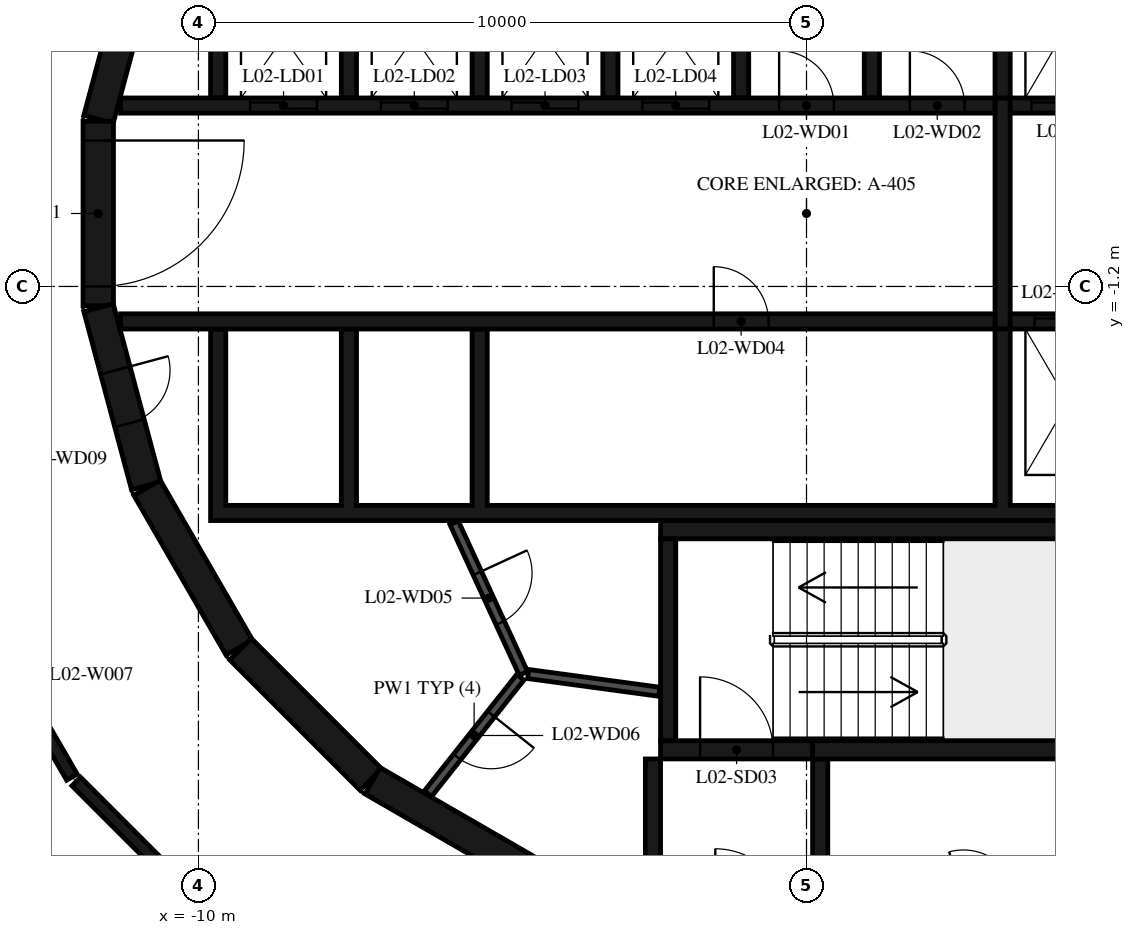
"""IFC4 building model, lengths in metres.
Left out: names, types, materials, properties, quantities, classifications, styles, units other than length and angle.
Written with IfcOpenShell. Run it as: python <this file> out.ifc"""

import sys

from ifc_helpers import new_model, si_unit, direction, frame, frame_2d, origin, place, context, subcontext, project, spatial, polyline, rectangle, outline, extrude, element, fill, save


model = new_model("IFC4")
c1 = context("Model", 3, precision=1e-05, world=origin(), true_north=direction((0.0, 1.0)))
c2 = subcontext(c1, "Body", "Model", "MODEL_VIEW")
j1 = project(units=[si_unit("LENGTHUNIT", "METRE"), si_unit("PLANEANGLEUNIT", "RADIAN")], contexts=[c1])
p1 = place(None, origin())
s1 = spatial("IfcSite", under=j1, at=p1, CompositionType="ELEMENT")
p2 = place(p1, origin())
s2 = spatial("IfcBuilding", under=s1, at=p2, CompositionType="ELEMENT")
p3 = place(p2, frame((0.0, 0.0, 13.8)))
s3 = spatial("IfcBuildingStorey", under=s2, at=p3, CompositionType="ELEMENT", Elevation=13.8)
p4 = place(p3, frame((-10.858, 4.479, 0.0), z_axis=(0.0, 0.0, 1.0), x_axis=(-0.258734743916, -0.965948410781, 0.0)))
e1 = element("IfcWall", 1, at=p4, inside=s3, PredefinedType="SHEAR", context=c2, shape_type="SweptSolid", body=[
    extrude(rectangle(XDim=3.033, YDim=0.5, at=frame_2d((1.516, 0.0))), origin(), (0.0, 0.0, 1.0), 4.42),
])
p5 = place(p3, frame((-11.647, 1.516, 0.0), z_axis=(0.0, 0.0, 1.0), x_axis=(0.0, -1.0, 0.0)))
e2 = element("IfcWall", 2, at=p5, inside=s3, PredefinedType="SHEAR", context=c2, shape_type="SweptSolid", body=[
    extrude(rectangle(XDim=3.033, YDim=0.5, at=frame_2d((1.516, 0.0))), origin(), (0.0, 0.0, 1.0), 4.42),
])
p6 = place(p5, frame((0.316, 0.0, 0.0)))
e3 = element("IfcOpeningElement", 3, at=p6, cuts=e2, PredefinedType="OPENING", context=c2, shape_type="SweptSolid", body=[
    extrude(rectangle(XDim=2.4, YDim=2.1, at=frame_2d((1.2, 1.05))), frame((0.0, 0.26, 0.0), z_axis=(0.0, -1.0, 0.0), x_axis=(1.0, 0.0, 0.0)), (0.0, 0.0, 1.0), 0.52),
])
p7 = place(p3, frame((-11.643, -1.55, 0.0), z_axis=(0.0, 0.0, 1.0), x_axis=(0.258734743916, -0.965948410781, 0.0)))
e4 = element("IfcWall", 4, at=p7, inside=s3, PredefinedType="SHEAR", context=c2, shape_type="SweptSolid", body=[
    extrude(rectangle(XDim=3.033, YDim=0.5, at=frame_2d((1.516, 0.0))), origin(), (0.0, 0.0, 1.0), 4.42),
])
p8 = place(p7, frame((1.066, 0.0, 0.0)))
e5 = element("IfcOpeningElement", 5, at=p8, cuts=e4, PredefinedType="OPENING", context=c2, shape_type="SweptSolid", body=[
    extrude(rectangle(XDim=0.9, YDim=2.1, at=frame_2d((0.45, 1.05))), frame((0.0, 0.26, 0.0), z_axis=(0.0, -1.0, 0.0), x_axis=(1.0, 0.0, 0.0)), (0.0, 0.0, 1.0), 0.52),
])
p9 = place(p3, frame((-10.845, -4.51, 0.0), z_axis=(0.0, 0.0, 1.0), x_axis=(0.500087131594, -0.865975092491, 0.0)))
e6 = element("IfcWall", 6, at=p9, inside=s3, PredefinedType="SHEAR", context=c2, shape_type="SweptSolid", body=[
    extrude(rectangle(XDim=3.033, YDim=0.5, at=frame_2d((1.516, 0.0))), origin(), (0.0, 0.0, 1.0), 4.42),
])
p10 = place(p3, frame((-9.308, -7.164, 0.0), z_axis=(0.0, 0.0, 1.0), x_axis=(0.707106781187, -0.707106781187, 0.0)))
e7 = element("IfcWall", 7, at=p10, inside=s3, PredefinedType="SHEAR", context=c2, shape_type="SweptSolid", body=[
    extrude(rectangle(XDim=3.032, YDim=0.5, at=frame_2d((1.516, 0.0))), origin(), (0.0, 0.0, 1.0), 4.42),
])
p11 = place(p3, frame((-7.137, -9.329, 0.0), z_axis=(0.0, 0.0, 1.0), x_axis=(0.865975092491, -0.500087131594, 0.0)))
e8 = element("IfcWall", 8, at=p11, inside=s3, PredefinedType="SHEAR", context=c2, shape_type="SweptSolid", body=[
    extrude(rectangle(XDim=3.033, YDim=0.5, at=frame_2d((1.516, 0.0))), origin(), (0.0, 0.0, 1.0), 4.42),
])
p12 = place(p3, frame((-2.275, -8.67, 0.0), z_axis=(0.0, 0.0, 1.0), x_axis=(0.0, 1.0, 0.0)))
e9 = element("IfcWall", 9, at=p12, inside=s3, PredefinedType="SHEAR", context=c2, shape_type="SweptSolid", body=[
    extrude(rectangle(XDim=3.32, YDim=0.25, at=frame_2d((1.66, 0.0))), origin(), (0.0, 0.0, 1.0), 4.42),
])
p13 = place(p3, frame((-2.4, -5.2, 0.0), z_axis=(0.0, 0.0, 1.0), x_axis=(1.0, 0.0, 0.0)))
e10 = element("IfcWall", 10, at=p13, inside=s3, PredefinedType="SHEAR", context=c2, shape_type="SweptSolid", body=[
    extrude(rectangle(XDim=7.05, YDim=0.3, at=frame_2d((3.525, 0.0))), origin(), (0.0, 0.0, 1.0), 4.42),
])
p14 = place(p3, frame((0.1, -8.82, 0.0), z_axis=(0.0, 0.0, 1.0), x_axis=(1.0, 0.0, 0.0)))
e11 = element("IfcWall", 11, at=p14, inside=s3, PredefinedType="SHEAR", context=c2, shape_type="SweptSolid", body=[
    extrude(rectangle(XDim=4.55, YDim=0.3, at=frame_2d((2.275, 0.0))), origin(), (0.0, 0.0, 1.0), 4.42),
])
p15 = place(p3, frame((-2.4, -8.82, 0.0), z_axis=(0.0, 0.0, 1.0), x_axis=(1.0, 0.0, 0.0)))
e12 = element("IfcWall", 12, at=p15, inside=s3, PredefinedType="SHEAR", context=c2, shape_type="SweptSolid", body=[
    extrude(rectangle(XDim=2.5, YDim=0.3, at=frame_2d((1.25, 0.0))), origin(), (0.0, 0.0, 1.0), 4.42),
])
p16 = place(p15, frame((0.65, 0.0, 0.0)))
e13 = element("IfcOpeningElement", 13, at=p16, cuts=e12, PredefinedType="OPENING", context=c2, shape_type="SweptSolid", body=[
    extrude(rectangle(XDim=1.2, YDim=2.1, at=frame_2d((0.6, 1.05))), frame((0.0, 0.16, 0.0), z_axis=(0.0, -1.0, 0.0), x_axis=(1.0, 0.0, 0.0)), (0.0, 0.0, 1.0), 0.32),
])
p17 = place(p3, frame((-2.525, -8.97, 0.0), z_axis=(0.0, 0.0, 1.0), x_axis=(0.0, -1.0, 0.0)))
e14 = element("IfcWall", 14, at=p17, inside=s3, PredefinedType="SHEAR", context=c2, shape_type="SweptSolid", body=[
    extrude(rectangle(XDim=2.11, YDim=0.25, at=frame_2d((1.055, 0.0))), origin(), (0.0, 0.0, 1.0), 4.42),
])
p18 = place(p3, frame((0.225, -8.97, 0.0), z_axis=(0.0, 0.0, 1.0), x_axis=(0.0, -1.0, 0.0)))
e15 = element("IfcWall", 15, at=p18, inside=s3, PredefinedType="SHEAR", context=c2, shape_type="SweptSolid", body=[
    extrude(rectangle(XDim=2.41, YDim=0.25, at=frame_2d((1.205, 0.0))), origin(), (0.0, 0.0, 1.0), 4.42),
])
p19 = place(p3, origin())
e16 = element("IfcWall", 16, at=p19, inside=s3, PredefinedType="SHEAR", context=c2, shape_type="SweptSolid", body=[
    extrude(outline(polyline([(-9.55, 4.8), (-7.65, 4.8), (-7.65, 1.9), (-7.4, 1.9), (-7.4, 4.8), (-5.5, 4.8), (-5.5, 1.9), (-5.25, 1.9), (-5.25, 4.8), (-3.35, 4.8), (-3.35, 1.9), (-3.1, 1.9), (-3.1, 4.8), (-1.2, 4.8), (-1.2, 1.9), (-0.95, 1.9), (-0.95, 4.8), (0.95, 4.8), (0.95, 1.9), (1.2, 1.9), (1.2, 4.8), (3.1, 4.8), (3.1, 1.9), (3.35, 1.9), (3.35, 4.8), (5.25, 4.8), (5.25, 1.9), (5.5, 1.9), (5.5, 4.8), (7.4, 4.8), (7.4, 1.9), (7.65, 1.9), (7.65, 4.8), (9.55, 4.8), (9.55, 1.9), (9.8, 1.9), (9.8, 4.8), (9.8, 5.05), (-9.8, 5.05), (-9.8, 4.8), (-9.8, 1.9), (-9.55, 1.9), (-9.55, 4.8)])), origin(), (0.0, 0.0, 1.0), 4.42),
])
p20 = place(p3, origin())
e17 = element("IfcWall", 17, at=p20, inside=s3, PredefinedType="SHEAR", context=c2, shape_type="SweptSolid", body=[
    extrude(outline(polyline([(9.8, -5.05), (9.8, -4.8), (9.8, -1.9), (9.55, -1.9), (9.55, -4.8), (7.65, -4.8), (7.65, -1.9), (7.4, -1.9), (7.4, -4.8), (5.5, -4.8), (5.5, -1.9), (5.25, -1.9), (5.25, -4.8), (3.35, -4.8), (3.35, -1.9), (3.1, -1.9), (3.1, -4.8), (-5.25, -4.8), (-5.25, -1.9), (-5.5, -1.9), (-5.5, -4.8), (-7.4, -4.8), (-7.4, -1.9), (-7.65, -1.9), (-7.65, -4.8), (-9.55, -4.8), (-9.55, -1.9), (-9.8, -1.9), (-9.8, -4.8), (-9.8, -5.05), (9.8, -5.05)])), origin(), (0.0, 0.0, 1.0), 4.42),
])
p21 = place(p3, frame((-11.28, 1.775, 0.0), z_axis=(0.0, 0.0, 1.0), x_axis=(1.0, 0.0, 0.0)))
e18 = element("IfcWall", 18, at=p21, inside=s3, PredefinedType="SHEAR", context=c2, shape_type="SweptSolid", body=[
    extrude(rectangle(XDim=14.38, YDim=0.25, at=frame_2d((7.19, 0.0))), origin(), (0.0, 0.0, 1.0), 4.42),
])
p22 = place(p21, frame((2.13, 0.0, 0.0)))
e19 = element("IfcOpeningElement", 19, at=p22, cuts=e18, PredefinedType="OPENING", context=c2, shape_type="SweptSolid", body=[
    extrude(rectangle(XDim=1.1, YDim=2.1, at=frame_2d((0.55, 1.05))), frame((0.0, 0.135, 0.0), z_axis=(0.0, -1.0, 0.0), x_axis=(1.0, 0.0, 0.0)), (0.0, 0.0, 1.0), 0.27),
])
p23 = place(p21, frame((4.28, 0.0, 0.0)))
e20 = element("IfcOpeningElement", 20, at=p23, cuts=e18, PredefinedType="OPENING", context=c2, shape_type="SweptSolid", body=[
    extrude(rectangle(XDim=1.1, YDim=2.1, at=frame_2d((0.55, 1.05))), frame((0.0, 0.135, 0.0), z_axis=(0.0, -1.0, 0.0), x_axis=(1.0, 0.0, 0.0)), (0.0, 0.0, 1.0), 0.27),
])
p24 = place(p21, frame((6.43, 0.0, 0.0)))
e21 = element("IfcOpeningElement", 21, at=p24, cuts=e18, PredefinedType="OPENING", context=c2, shape_type="SweptSolid", body=[
    extrude(rectangle(XDim=1.1, YDim=2.1, at=frame_2d((0.55, 1.05))), frame((0.0, 0.135, 0.0), z_axis=(0.0, -1.0, 0.0), x_axis=(1.0, 0.0, 0.0)), (0.0, 0.0, 1.0), 0.27),
])
p25 = place(p21, frame((8.58, 0.0, 0.0)))
e22 = element("IfcOpeningElement", 22, at=p25, cuts=e18, PredefinedType="OPENING", context=c2, shape_type="SweptSolid", body=[
    extrude(rectangle(XDim=1.1, YDim=2.1, at=frame_2d((0.55, 1.05))), frame((0.0, 0.135, 0.0), z_axis=(0.0, -1.0, 0.0), x_axis=(1.0, 0.0, 0.0)), (0.0, 0.0, 1.0), 0.27),
])
p26 = place(p21, frame((10.83, 0.0, 0.0)))
e23 = element("IfcOpeningElement", 23, at=p26, cuts=e18, PredefinedType="OPENING", context=c2, shape_type="SweptSolid", body=[
    extrude(rectangle(XDim=0.9, YDim=2.1, at=frame_2d((0.45, 1.05))), frame((0.0, 0.135, 0.0), z_axis=(0.0, -1.0, 0.0), x_axis=(1.0, 0.0, 0.0)), (0.0, 0.0, 1.0), 0.27),
])
p27 = place(p21, frame((12.98, 0.0, 0.0)))
e24 = element("IfcOpeningElement", 24, at=p27, cuts=e18, PredefinedType="OPENING", context=c2, shape_type="SweptSolid", body=[
    extrude(rectangle(XDim=0.9, YDim=2.1, at=frame_2d((0.45, 1.05))), frame((0.0, 0.135, 0.0), z_axis=(0.0, -1.0, 0.0), x_axis=(1.0, 0.0, 0.0)), (0.0, 0.0, 1.0), 0.27),
])
p28 = place(p3, frame((3.35, 1.775, 0.0), z_axis=(0.0, 0.0, 1.0), x_axis=(1.0, 0.0, 0.0)))
e25 = element("IfcWall", 25, at=p28, inside=s3, PredefinedType="SHEAR", context=c2, shape_type="SweptSolid", body=[
    extrude(rectangle(XDim=7.93, YDim=0.25, at=frame_2d((3.965, 0.0))), origin(), (0.0, 0.0, 1.0), 4.42),
])
p29 = place(p28, frame((0.35, 0.0, 0.0)))
e26 = element("IfcOpeningElement", 26, at=p29, cuts=e25, PredefinedType="OPENING", context=c2, shape_type="SweptSolid", body=[
    extrude(rectangle(XDim=1.2, YDim=2.4, at=frame_2d((0.6, 1.2))), frame((0.0, 0.135, 0.0), z_axis=(0.0, -1.0, 0.0), x_axis=(1.0, 0.0, 0.0)), (0.0, 0.0, 1.0), 0.27),
])
p30 = place(p28, frame((2.5, 0.0, 0.0)))
e27 = element("IfcOpeningElement", 27, at=p30, cuts=e25, PredefinedType="OPENING", context=c2, shape_type="SweptSolid", body=[
    extrude(rectangle(XDim=1.2, YDim=2.4, at=frame_2d((0.6, 1.2))), frame((0.0, 0.135, 0.0), z_axis=(0.0, -1.0, 0.0), x_axis=(1.0, 0.0, 0.0)), (0.0, 0.0, 1.0), 0.27),
])
p31 = place(p28, frame((4.8, 0.0, 0.0)))
e28 = element("IfcOpeningElement", 28, at=p31, cuts=e25, PredefinedType="OPENING", context=c2, shape_type="SweptSolid", body=[
    extrude(rectangle(XDim=0.9, YDim=2.1, at=frame_2d((0.45, 1.05))), frame((0.0, 0.135, 0.0), z_axis=(0.0, -1.0, 0.0), x_axis=(1.0, 0.0, 0.0)), (0.0, 0.0, 1.0), 0.27),
])
p32 = place(p3, frame((-11.28, -1.775, 0.0), z_axis=(0.0, 0.0, 1.0), x_axis=(1.0, 0.0, 0.0)))
e29 = element("IfcWall", 29, at=p32, inside=s3, PredefinedType="SHEAR", context=c2, shape_type="SweptSolid", body=[
    extrude(rectangle(XDim=14.38, YDim=0.25, at=frame_2d((7.19, 0.0))), origin(), (0.0, 0.0, 1.0), 4.42),
])
p33 = place(p32, frame((9.755, 0.0, 0.0)))
e30 = element("IfcOpeningElement", 30, at=p33, cuts=e29, PredefinedType="OPENING", context=c2, shape_type="SweptSolid", body=[
    extrude(rectangle(XDim=0.9, YDim=2.1, at=frame_2d((0.45, 1.05))), frame((0.0, 0.135, 0.0), z_axis=(0.0, -1.0, 0.0), x_axis=(1.0, 0.0, 0.0)), (0.0, 0.0, 1.0), 0.27),
])
p34 = place(p3, frame((3.35, -1.775, 0.0), z_axis=(0.0, 0.0, 1.0), x_axis=(1.0, 0.0, 0.0)))
e31 = element("IfcWall", 31, at=p34, inside=s3, PredefinedType="SHEAR", context=c2, shape_type="SweptSolid", body=[
    extrude(rectangle(XDim=7.93, YDim=0.25, at=frame_2d((3.965, 0.0))), origin(), (0.0, 0.0, 1.0), 4.42),
])
p35 = place(p34, frame((0.4, 0.0, 0.0)))
e32 = element("IfcOpeningElement", 32, at=p35, cuts=e31, PredefinedType="OPENING", context=c2, shape_type="SweptSolid", body=[
    extrude(rectangle(XDim=1.1, YDim=2.4, at=frame_2d((0.55, 1.2))), frame((0.0, 0.135, 0.0), z_axis=(0.0, -1.0, 0.0), x_axis=(1.0, 0.0, 0.0)), (0.0, 0.0, 1.0), 0.27),
])
p36 = place(p34, frame((2.55, 0.0, 0.0)))
e33 = element("IfcOpeningElement", 33, at=p36, cuts=e31, PredefinedType="OPENING", context=c2, shape_type="SweptSolid", body=[
    extrude(rectangle(XDim=1.1, YDim=2.4, at=frame_2d((0.55, 1.2))), frame((0.0, 0.135, 0.0), z_axis=(0.0, -1.0, 0.0), x_axis=(1.0, 0.0, 0.0)), (0.0, 0.0, 1.0), 0.27),
])
p37 = place(p34, frame((4.7, 0.0, 0.0)))
e34 = element("IfcOpeningElement", 34, at=p37, cuts=e31, PredefinedType="OPENING", context=c2, shape_type="SweptSolid", body=[
    extrude(rectangle(XDim=1.1, YDim=2.4, at=frame_2d((0.55, 1.2))), frame((0.0, 0.135, 0.0), z_axis=(0.0, -1.0, 0.0), x_axis=(1.0, 0.0, 0.0)), (0.0, 0.0, 1.0), 0.27),
])
p38 = place(p3, frame((3.225, -1.9, 0.0), z_axis=(0.0, 0.0, 1.0), x_axis=(0.0, 1.0, 0.0)))
e35 = element("IfcWall", 35, at=p38, inside=s3, PredefinedType="SHEAR", context=c2, shape_type="SweptSolid", body=[
    extrude(rectangle(XDim=3.8, YDim=0.25, at=frame_2d((1.9, 0.0))), origin(), (0.0, 0.0, 1.0), 4.42),
])
p39 = place(p3, frame((-5.795, -5.086, 0.0), z_axis=(0.0, 0.0, 1.0), x_axis=(0.417887867606, -0.908498613157, 0.0)))
e36 = element("IfcWall", 36, at=p39, inside=s3, PredefinedType="PARTITIONING", context=c2, shape_type="SweptSolid", body=[
    extrude(rectangle(XDim=2.726, YDim=0.15, at=frame_2d((1.363, 0.0))), origin(), (0.0, 0.0, 1.0), 4.42),
])
p40 = place(p39, frame((0.913, 0.0, 0.0)))
e37 = element("IfcOpeningElement", 37, at=p40, cuts=e36, PredefinedType="OPENING", context=c2, shape_type="SweptSolid", body=[
    extrude(rectangle(XDim=0.9, YDim=2.1, at=frame_2d((0.45, 1.05))), frame((0.0, 0.085, 0.0), z_axis=(0.0, -1.0, 0.0), x_axis=(1.0, 0.0, 0.0)), (0.0, 0.0, 1.0), 0.17),
])
p41 = place(p3, frame((-4.706, -7.625, 0.0), z_axis=(0.0, 0.0, 1.0), x_axis=(-0.621392599334, -0.783499353856, 0.0)))
e38 = element("IfcWall", 38, at=p41, inside=s3, PredefinedType="PARTITIONING", context=c2, shape_type="SweptSolid", body=[
    extrude(rectangle(XDim=2.447, YDim=0.15, at=frame_2d((1.224, 0.0))), origin(), (0.0, 0.0, 1.0), 4.42),
])
p42 = place(p41, frame((0.774, 0.0, 0.0)))
e39 = element("IfcOpeningElement", 39, at=p42, cuts=e38, PredefinedType="OPENING", context=c2, shape_type="SweptSolid", body=[
    extrude(rectangle(XDim=0.9, YDim=2.1, at=frame_2d((0.45, 1.05))), frame((0.0, 0.085, 0.0), z_axis=(0.0, -1.0, 0.0), x_axis=(1.0, 0.0, 0.0)), (0.0, 0.0, 1.0), 0.17),
])
p43 = place(p3, frame((-2.42, -7.865, 0.0), z_axis=(0.0, 0.0, 1.0), x_axis=(-0.990972299108, 0.134066783362, 0.0)))
e40 = element("IfcWall", 40, at=p43, inside=s3, PredefinedType="PARTITIONING", context=c2, shape_type="SweptSolid", body=[
    extrude(rectangle(XDim=2.176, YDim=0.15, at=frame_2d((1.088, 0.0))), origin(), (0.0, 0.0, 1.0), 4.42),
])
p44 = place(p3, frame((-14.02, -5.917, 0.0), z_axis=(0.0, 0.0, 1.0), x_axis=(0.500733182901, -0.865601686425, 0.0)))
e41 = element("IfcWall", 41, at=p44, inside=s3, PredefinedType="PARTITIONING", context=c2, shape_type="SweptSolid", body=[
    extrude(rectangle(XDim=3.874, YDim=0.2, at=frame_2d((1.937, 0.0))), origin(), (0.0, 0.0, 1.0), 4.42),
])
p45 = place(p3, frame((-12.009, -9.341, 0.0), z_axis=(0.0, 0.0, 1.0), x_axis=(0.707106781187, -0.707106781187, 0.0)))
e42 = element("IfcWall", 42, at=p45, inside=s3, PredefinedType="PARTITIONING", context=c2, shape_type="SweptSolid", body=[
    extrude(rectangle(XDim=3.874, YDim=0.2, at=frame_2d((1.937, 0.0))), origin(), (0.0, 0.0, 1.0), 4.42),
])
p46 = place(p16, origin())
e43 = element("IfcDoor", 43, at=p46, inside=s3, OperationType="SINGLE_SWING_LEFT", PredefinedType="DOOR", context=c2, shape_type="SweptSolid", body=[
    extrude(rectangle(XDim=1.2, YDim=2.1, at=frame_2d((0.6, 1.05))), frame((0.0, 0.025, 0.0), z_axis=(0.0, -1.0, 0.0), x_axis=(1.0, 0.0, 0.0)), (0.0, 0.0, 1.0), 0.05),
])
fill(e13, e43)
p47 = place(p6, origin())
e44 = element("IfcDoor", 44, at=p47, inside=s3, OperationType="DOUBLE_DOOR_SINGLE_SWING", PredefinedType="DOOR", context=c2, shape_type="SweptSolid", body=[
    extrude(rectangle(XDim=2.4, YDim=2.1, at=frame_2d((1.2, 1.05))), frame((0.0, 0.025, 0.0), z_axis=(0.0, -1.0, 0.0), x_axis=(1.0, 0.0, 0.0)), (0.0, 0.0, 1.0), 0.05),
])
fill(e3, e44)
p48 = place(p22, origin())
e45 = element("IfcDoor", 45, at=p48, inside=s3, OperationType="DOUBLE_DOOR_SLIDING", PredefinedType="DOOR", context=c2, shape_type="SweptSolid", body=[
    extrude(rectangle(XDim=1.1, YDim=2.1, at=frame_2d((0.55, 1.05))), frame((0.0, 0.025, 0.0), z_axis=(0.0, -1.0, 0.0), x_axis=(1.0, 0.0, 0.0)), (0.0, 0.0, 1.0), 0.05),
])
fill(e19, e45)
p49 = place(p23, origin())
e46 = element("IfcDoor", 46, at=p49, inside=s3, OperationType="DOUBLE_DOOR_SLIDING", PredefinedType="DOOR", context=c2, shape_type="SweptSolid", body=[
    extrude(rectangle(XDim=1.1, YDim=2.1, at=frame_2d((0.55, 1.05))), frame((0.0, 0.025, 0.0), z_axis=(0.0, -1.0, 0.0), x_axis=(1.0, 0.0, 0.0)), (0.0, 0.0, 1.0), 0.05),
])
fill(e20, e46)
p50 = place(p24, origin())
e47 = element("IfcDoor", 47, at=p50, inside=s3, OperationType="DOUBLE_DOOR_SLIDING", PredefinedType="DOOR", context=c2, shape_type="SweptSolid", body=[
    extrude(rectangle(XDim=1.1, YDim=2.1, at=frame_2d((0.55, 1.05))), frame((0.0, 0.025, 0.0), z_axis=(0.0, -1.0, 0.0), x_axis=(1.0, 0.0, 0.0)), (0.0, 0.0, 1.0), 0.05),
])
fill(e21, e47)
p51 = place(p25, origin())
e48 = element("IfcDoor", 48, at=p51, inside=s3, OperationType="DOUBLE_DOOR_SLIDING", PredefinedType="DOOR", context=c2, shape_type="SweptSolid", body=[
    extrude(rectangle(XDim=1.1, YDim=2.1, at=frame_2d((0.55, 1.05))), frame((0.0, 0.025, 0.0), z_axis=(0.0, -1.0, 0.0), x_axis=(1.0, 0.0, 0.0)), (0.0, 0.0, 1.0), 0.05),
])
fill(e22, e48)
p52 = place(p29, origin())
e49 = element("IfcDoor", 49, at=p52, inside=s3, OperationType="DOUBLE_DOOR_SLIDING", PredefinedType="DOOR", context=c2, shape_type="SweptSolid", body=[
    extrude(rectangle(XDim=1.2, YDim=2.4, at=frame_2d((0.6, 1.2))), frame((0.0, 0.025, 0.0), z_axis=(0.0, -1.0, 0.0), x_axis=(1.0, 0.0, 0.0)), (0.0, 0.0, 1.0), 0.05),
])
fill(e26, e49)
p53 = place(p35, origin())
e50 = element("IfcDoor", 50, at=p53, inside=s3, OperationType="DOUBLE_DOOR_SLIDING", PredefinedType="DOOR", context=c2, shape_type="SweptSolid", body=[
    extrude(rectangle(XDim=1.1, YDim=2.4, at=frame_2d((0.55, 1.2))), frame((0.0, 0.025, 0.0), z_axis=(0.0, -1.0, 0.0), x_axis=(1.0, 0.0, 0.0)), (0.0, 0.0, 1.0), 0.05),
])
fill(e32, e50)
p54 = place(p26, origin())
e51 = element("IfcDoor", 51, at=p54, inside=s3, OperationType="SINGLE_SWING_RIGHT", PredefinedType="DOOR", context=c2, shape_type="SweptSolid", body=[
    extrude(rectangle(XDim=0.9, YDim=2.1, at=frame_2d((0.45, 1.05))), frame((0.0, 0.025, 0.0), z_axis=(0.0, -1.0, 0.0), x_axis=(1.0, 0.0, 0.0)), (0.0, 0.0, 1.0), 0.05),
])
fill(e23, e51)
p55 = place(p27, origin())
e52 = element("IfcDoor", 52, at=p55, inside=s3, OperationType="SINGLE_SWING_LEFT", PredefinedType="DOOR", context=c2, shape_type="SweptSolid", body=[
    extrude(rectangle(XDim=0.9, YDim=2.1, at=frame_2d((0.45, 1.05))), frame((0.0, 0.025, 0.0), z_axis=(0.0, -1.0, 0.0), x_axis=(1.0, 0.0, 0.0)), (0.0, 0.0, 1.0), 0.05),
])
fill(e24, e52)
p56 = place(p33, origin())
e53 = element("IfcDoor", 53, at=p56, inside=s3, OperationType="SINGLE_SWING_LEFT", PredefinedType="DOOR", context=c2, shape_type="SweptSolid", body=[
    extrude(rectangle(XDim=0.9, YDim=2.1, at=frame_2d((0.45, 1.05))), frame((0.0, 0.025, 0.0), z_axis=(0.0, -1.0, 0.0), x_axis=(1.0, 0.0, 0.0)), (0.0, 0.0, 1.0), 0.05),
])
fill(e30, e53)
p57 = place(p40, origin())
e54 = element("IfcDoor", 54, at=p57, inside=s3, OperationType="SINGLE_SWING_RIGHT", PredefinedType="DOOR", context=c2, shape_type="SweptSolid", body=[
    extrude(rectangle(XDim=0.9, YDim=2.1, at=frame_2d((0.45, 1.05))), frame((0.0, 0.025, 0.0), z_axis=(0.0, -1.0, 0.0), x_axis=(1.0, 0.0, 0.0)), (0.0, 0.0, 1.0), 0.05),
])
fill(e37, e54)
p58 = place(p42, origin())
e55 = element("IfcDoor", 55, at=p58, inside=s3, OperationType="SINGLE_SWING_LEFT", PredefinedType="DOOR", context=c2, shape_type="SweptSolid", body=[
    extrude(rectangle(XDim=0.9, YDim=2.1, at=frame_2d((0.45, 1.05))), frame((0.0, 0.025, 0.0), z_axis=(0.0, -1.0, 0.0), x_axis=(1.0, 0.0, 0.0)), (0.0, 0.0, 1.0), 0.05),
])
fill(e39, e55)
p59 = place(p8, origin())
e56 = element("IfcDoor", 56, at=p59, inside=s3, OperationType="SINGLE_SWING_RIGHT", PredefinedType="DOOR", context=c2, shape_type="SweptSolid", body=[
    extrude(rectangle(XDim=0.9, YDim=2.1, at=frame_2d((0.45, 1.05))), frame((0.0, 0.025, 0.0), z_axis=(0.0, -1.0, 0.0), x_axis=(1.0, 0.0, 0.0)), (0.0, 0.0, 1.0), 0.05),
])
fill(e5, e56)
save(model, sys.argv[1])
